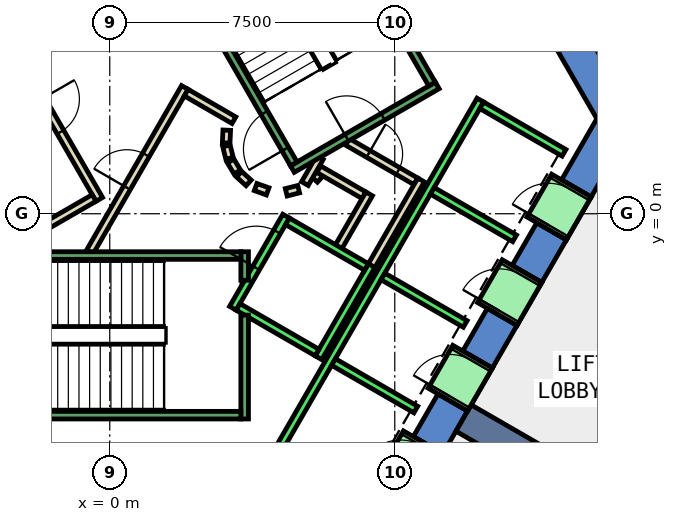
"""IFC4 building model, lengths in metres.
Left out: names, types, materials, properties, quantities, classifications, styles, units other than length and angle.
Written with IfcOpenShell. Run it as: python <this file> out.ifc"""

import sys

from ifc_helpers import new_model, si_unit, direction, frame, frame_2d, origin, place, context, subcontext, project, spatial, polyline, rectangle, outline, extrude, element, fill, save


model = new_model("IFC4")
c1 = context("Model", 3, precision=1e-05, world=origin(), true_north=direction((0.0, 1.0)))
c2 = subcontext(c1, "Body", "Model", "MODEL_VIEW")
j1 = project(units=[si_unit("LENGTHUNIT", "METRE"), si_unit("PLANEANGLEUNIT", "RADIAN")], contexts=[c1])
p1 = place(None, origin())
s1 = spatial("IfcSite", under=j1, at=p1, CompositionType="ELEMENT")
p2 = place(p1, origin())
s2 = spatial("IfcBuilding", under=s1, at=p2, CompositionType="ELEMENT")
p3 = place(p2, frame((0.0, 0.0, 95.0)))
s3 = spatial("IfcBuildingStorey", under=s2, at=p3, CompositionType="ELEMENT", Elevation=95.0)
p4 = place(p3, frame((0.0, 0.0, -0.4)))
e1 = element("IfcWall", 1, at=p4, inside=s3, PredefinedType="SHEAR", context=c2, shape_type="SweptSolid", body=[
    extrude(outline(polyline([(8.517, 11.748), (7.738, 11.298), (12.817, 2.5), (13.856, 2.5), (8.517, 11.748)])), origin(), (0.0, 0.0, 1.0), 4.2),
])
p5 = place(p3, frame((0.0, 0.0, -0.4)))
e2 = element("IfcWall", 2, at=p5, inside=s3, PredefinedType="SHEAR", context=c2, shape_type="SweptSolid", body=[
    extrude(outline(polyline([(9.417, -5.189), (8.638, -4.739), (7.988, -5.864), (8.767, -6.314), (9.417, -5.189)])), origin(), (0.0, 0.0, 1.0), 4.2),
])
p6 = place(p3, frame((0.0, 0.0, -0.4)))
e3 = element("IfcWall", 3, at=p6, inside=s3, PredefinedType="SHEAR", context=c2, shape_type="SweptSolid", body=[
    extrude(outline(polyline([(10.717, -2.937), (9.938, -2.487), (9.288, -3.613), (10.067, -4.063), (10.717, -2.937)])), origin(), (0.0, 0.0, 1.0), 4.2),
])
p7 = place(p3, frame((0.0, 0.0, -0.4)))
e4 = element("IfcWall", 4, at=p7, inside=s3, PredefinedType="SHEAR", context=c2, shape_type="SweptSolid", body=[
    extrude(outline(polyline([(12.017, -0.686), (11.238, -0.236), (10.588, -1.361), (11.367, -1.811), (12.017, -0.686)])), origin(), (0.0, 0.0, 1.0), 4.2),
])
p8 = place(p3, frame((0.0, 0.0, -0.4)))
e5 = element("IfcWall", 5, at=p8, inside=s3, PredefinedType="SHEAR", context=c2, shape_type="SweptSolid", body=[
    extrude(outline(polyline([(11.888, 0.89), (12.667, 0.44), (13.856, 2.5), (12.817, 2.5), (11.888, 0.89)])), origin(), (0.0, 0.0, 1.0), 4.2),
])
p9 = place(p3, frame((0.0, 0.0, 3.6)))
e6 = element("IfcWall", 6, at=p9, inside=s3, PredefinedType="SHEAR", context=c2, shape_type="SweptSolid", body=[
    extrude(outline(polyline([(8.767, -6.314), (7.988, -5.864), (7.338, -6.99), (8.117, -7.44), (8.767, -6.314)])), origin(), (0.0, 0.0, 1.0), 0.2),
])
p10 = place(p3, frame((0.0, 0.0, 3.6)))
e7 = element("IfcWall", 7, at=p10, inside=s3, PredefinedType="SHEAR", context=c2, shape_type="SweptSolid", body=[
    extrude(outline(polyline([(10.067, -4.063), (9.288, -3.613), (8.638, -4.739), (9.417, -5.189), (10.067, -4.063)])), origin(), (0.0, 0.0, 1.0), 0.2),
])
p11 = place(p3, frame((0.0, 0.0, 3.6)))
e8 = element("IfcWall", 8, at=p11, inside=s3, PredefinedType="SHEAR", context=c2, shape_type="SweptSolid", body=[
    extrude(outline(polyline([(11.367, -1.811), (10.588, -1.361), (9.938, -2.487), (10.717, -2.937), (11.367, -1.811)])), origin(), (0.0, 0.0, 1.0), 0.2),
])
p12 = place(p3, frame((0.0, 0.0, 3.6)))
e9 = element("IfcWall", 9, at=p12, inside=s3, PredefinedType="SHEAR", context=c2, shape_type="SweptSolid", body=[
    extrude(outline(polyline([(12.667, 0.44), (11.888, 0.89), (11.238, -0.236), (12.017, -0.686), (12.667, 0.44)])), origin(), (0.0, 0.0, 1.0), 0.2),
])
p13 = place(p3, frame((9.31, -5.375, -0.4), z_axis=(0.0, 0.0, 1.0), x_axis=(0.866017533419, -0.500013631625, 0.0)))
e10 = element("IfcWall", 10, at=p13, inside=s3, PredefinedType="SHEAR", context=c2, shape_type="SweptSolid", body=[
    extrude(rectangle(XDim=9.0, YDim=0.8, at=frame_2d((4.5, 0.0))), origin(), (0.0, 0.0, 1.0), 4.2),
])
p14 = place(p3, frame((5.39, 0.898, 0.0), z_axis=(0.0, 0.0, 1.0), x_axis=(0.673828488714, 0.738887791073, 0.0)))
e11 = element("IfcWall", 11, at=p14, inside=s3, PredefinedType="PARTITIONING", context=c2, shape_type="SweptSolid", body=[
    extrude(rectangle(XDim=0.263, YDim=0.2, at=frame_2d((0.131, 0.0))), origin(), (0.0, 0.0, 1.0), 3.8),
])
p15 = place(p3, frame((5.499, 1.172, 0.0), z_axis=(0.0, 0.0, 1.0), x_axis=(0.866333505267, -0.499465972466, 0.0)))
e12 = element("IfcWall", 12, at=p15, inside=s3, PredefinedType="PARTITIONING", context=c2, shape_type="SweptSolid", body=[
    extrude(rectangle(XDim=1.374, YDim=0.2, at=frame_2d((0.687, 0.0))), origin(), (0.0, 0.0, 1.0), 3.8),
])
p16 = place(p3, frame((6.826, 0.522, 0.0), z_axis=(0.0, 0.0, 1.0), x_axis=(-0.500016722714, -0.866015748706, 0.0)))
e13 = element("IfcWall", 13, at=p16, inside=s3, PredefinedType="PARTITIONING", context=c2, shape_type="SweptSolid", body=[
    extrude(rectangle(XDim=1.7, YDim=0.2, at=frame_2d((0.85, 0.0))), origin(), (0.0, 0.0, 1.0), 3.8),
])
p17 = place(p3, frame((6.25, 1.894, 0.0), z_axis=(0.0, 0.0, 1.0), x_axis=(0.866043184279, -0.499969202016, 0.0)))
e14 = element("IfcWall", 14, at=p17, inside=s3, PredefinedType="PARTITIONING", context=c2, shape_type="SweptSolid", body=[
    extrude(rectangle(XDim=2.084, YDim=0.2, at=frame_2d((1.042, 0.0))), origin(), (0.0, 0.0, 1.0), 3.8),
])
p18 = place(p17, frame((0.642, 0.0, 0.0)))
e15 = element("IfcOpeningElement", 15, at=p18, cuts=e14, PredefinedType="OPENING", context=c2, shape_type="SweptSolid", body=[
    extrude(rectangle(XDim=0.9, YDim=2.1, at=frame_2d((0.45, 1.05))), frame((0.0, 0.11, 0.0), z_axis=(0.0, -1.0, 0.0), x_axis=(1.0, 0.0, 0.0)), (0.0, 0.0, 1.0), 0.22),
])
p19 = place(p3, frame((8.192, 0.888, 0.0), z_axis=(0.0, 0.0, 1.0), x_axis=(-0.499940625693, -0.866059680843, 0.0)))
e16 = element("IfcWall", 16, at=p19, inside=s3, PredefinedType="PARTITIONING", context=c2, shape_type="SweptSolid", body=[
    extrude(rectangle(XDim=2.68, YDim=0.2, at=frame_2d((1.34, 0.0))), origin(), (0.0, 0.0, 1.0), 3.8),
])
p20 = place(p3, frame((5.135, 0.793, 0.0), z_axis=(0.0, 0.0, 1.0), x_axis=(0.499526442893, 0.866298639529, 0.0)))
e17 = element("IfcWall", 17, at=p20, inside=s3, PredefinedType="PARTITIONING", context=c2, shape_type="SweptSolid", body=[
    extrude(rectangle(XDim=0.791, YDim=0.2, at=frame_2d((0.396, 0.0))), origin(), (0.0, 0.0, 1.0), 3.8),
])
p21 = place(p3, frame((-0.52, -1.0, 0.0), z_axis=(0.0, 0.0, 1.0), x_axis=(0.50011622646, 0.865958290007, 0.0)))
e18 = element("IfcWall", 18, at=p21, inside=s3, PredefinedType="PARTITIONING", context=c2, shape_type="SweptSolid", body=[
    extrude(rectangle(XDim=4.991, YDim=0.2, at=frame_2d((2.496, 0.0))), origin(), (0.0, 0.0, 1.0), 3.8),
])
p22 = place(p21, frame((1.945, 0.0, 0.0)))
e19 = element("IfcOpeningElement", 19, at=p22, cuts=e18, PredefinedType="OPENING", context=c2, shape_type="SweptSolid", body=[
    extrude(rectangle(XDim=1.0, YDim=2.1, at=frame_2d((0.5, 1.05))), frame((0.0, 0.11, 0.0), z_axis=(0.0, -1.0, 0.0), x_axis=(1.0, 0.0, 0.0)), (0.0, 0.0, 1.0), 0.22),
])
p23 = place(p3, frame((2.012, 3.186, 0.0), z_axis=(0.0, 0.0, 1.0), x_axis=(0.865891012941, -0.500232699559, 0.0)))
e20 = element("IfcWall", 20, at=p23, inside=s3, PredefinedType="PARTITIONING", context=c2, shape_type="SweptSolid", body=[
    extrude(rectangle(XDim=1.449, YDim=0.2, at=frame_2d((0.725, 0.0))), origin(), (0.0, 0.0, 1.0), 3.8),
])
p24 = place(p3, frame((3.079, 2.199, 0.0), z_axis=(0.0, 0.0, 1.0), x_axis=(-0.047771483479, -0.998858290933, 0.0)))
e21 = element("IfcWall", 21, at=p24, inside=s3, PredefinedType="PARTITIONING", context=c2, shape_type="SweptSolid", body=[
    extrude(rectangle(XDim=0.337, YDim=0.2, at=frame_2d((0.169, 0.0))), origin(), (0.0, 0.0, 1.0), 3.8),
])
p25 = place(p3, frame((3.07, 1.786, 0.0), z_axis=(0.0, 0.0, 1.0), x_axis=(0.242705583207, -0.970099994784, 0.0)))
e22 = element("IfcWall", 22, at=p25, inside=s3, PredefinedType="PARTITIONING", context=c2, shape_type="SweptSolid", body=[
    extrude(rectangle(XDim=0.338, YDim=0.2, at=frame_2d((0.169, 0.0))), origin(), (0.0, 0.0, 1.0), 3.8),
])
for number, where, z_axis, x_axis in (
    (23, (3.182, 1.388, 0.0), (0.0, 0.0, 1.0), (0.512, -0.859, 0.0)),
    (24, (3.404, 1.039, 0.0), (0.0, 0.0, 1.0), (0.74, -0.672, 0.0)),
):
    element("IfcWall", number, at=place(p3, frame(where, z_axis=z_axis, x_axis=x_axis)), inside=s3, PredefinedType="PARTITIONING", context=c2, shape_type="SweptSolid", body=[
        extrude(rectangle(XDim=0.338, YDim=0.2, at=frame_2d((0.169, 0.0))), origin(), (0.0, 0.0, 1.0), 3.8),
    ])
p26 = place(p3, frame((3.838, 0.702, 0.0), z_axis=(0.0, 0.0, 1.0), x_axis=(0.941035081519, -0.338308993895, 0.0)))
e25 = element("IfcWall", 25, at=p26, inside=s3, PredefinedType="PARTITIONING", context=c2, shape_type="SweptSolid", body=[
    extrude(rectangle(XDim=0.337, YDim=0.2, at=frame_2d((0.168, 0.0))), origin(), (0.0, 0.0, 1.0), 3.8),
])
p27 = place(p3, frame((4.644, 0.564, 0.0), z_axis=(0.0, 0.0, 1.0), x_axis=(0.969929076366, 0.243387729394, 0.0)))
e26 = element("IfcWall", 26, at=p27, inside=s3, PredefinedType="PARTITIONING", context=c2, shape_type="SweptSolid", body=[
    extrude(rectangle(XDim=0.337, YDim=0.2, at=frame_2d((0.168, 0.0))), origin(), (0.0, 0.0, 1.0), 3.8),
])
p28 = place(p3, frame((-2.771, 4.7, 0.0), z_axis=(0.0, 0.0, 1.0), x_axis=(0.499969479948, -0.866043023828, 0.0)))
e27 = element("IfcWall", 27, at=p28, inside=s3, PredefinedType="PARTITIONING", context=c2, shape_type="SweptSolid", body=[
    extrude(rectangle(XDim=4.99, YDim=0.2, at=frame_2d((2.495, 0.0))), origin(), (0.0, 0.0, 1.0), 3.8),
])
p29 = place(p28, frame((1.945, 0.0, 0.0)))
e28 = element("IfcOpeningElement", 28, at=p29, cuts=e27, PredefinedType="OPENING", context=c2, shape_type="SweptSolid", body=[
    extrude(rectangle(XDim=1.0, YDim=2.1, at=frame_2d((0.5, 1.05))), frame((0.0, 0.11, 0.0), z_axis=(0.0, -1.0, 0.0), x_axis=(1.0, 0.0, 0.0)), (0.0, 0.0, 1.0), 0.22),
])
p30 = place(p3, frame((-0.412, 0.414, 0.0), z_axis=(0.0, 0.0, 1.0), x_axis=(-0.866017369001, -0.500013916395, 0.0)))
e29 = element("IfcWall", 29, at=p30, inside=s3, PredefinedType="PARTITIONING", context=c2, shape_type="SweptSolid", body=[
    extrude(rectangle(XDim=1.45, YDim=0.2, at=frame_2d((0.725, 0.0))), origin(), (0.0, 0.0, 1.0), 3.8),
])
p31 = place(p3, frame((18.009, 2.092, 0.0), z_axis=(0.0, 0.0, 1.0), x_axis=(-0.499980796252, -0.866036490789, 0.0)))
e30 = element("IfcWall", 30, at=p31, inside=s3, PredefinedType="PARTITIONING", context=c2, shape_type="SweptSolid", body=[
    extrude(rectangle(XDim=10.417, YDim=0.2, at=frame_2d((5.208, 0.0))), origin(), (0.0, 0.0, 1.0), 3.8),
])
p32 = place(p3, frame((3.24, -2.488, 0.0), z_axis=(0.0, 0.0, 1.0), x_axis=(0.49994636267, 0.866056369097, 0.0)))
e31 = element("IfcWall", 31, at=p32, inside=s3, PredefinedType="STANDARD", context=c2, shape_type="SweptSolid", body=[
    extrude(rectangle(XDim=2.8, YDim=0.2, at=frame_2d((1.4, 0.0))), origin(), (0.0, 0.0, 1.0), 3.8),
])
p33 = place(p32, frame((1.225, 0.0, 0.0)))
e32 = element("IfcOpeningElement", 32, at=p33, cuts=e31, PredefinedType="OPENING", context=c2, shape_type="SweptSolid", body=[
    extrude(rectangle(XDim=1.1, YDim=2.1, at=frame_2d((0.55, 1.05))), frame((0.0, 0.11, 0.0), z_axis=(0.0, -1.0, 0.0), x_axis=(1.0, 0.0, 0.0)), (0.0, 0.0, 1.0), 0.22),
])
p34 = place(p3, frame((5.492, -3.788, 0.0), z_axis=(0.0, 0.0, 1.0), x_axis=(0.500011755427, 0.866018616679, 0.0)))
e33 = element("IfcWall", 33, at=p34, inside=s3, PredefinedType="STANDARD", context=c2, shape_type="SweptSolid", body=[
    extrude(rectangle(XDim=2.8, YDim=0.2, at=frame_2d((1.4, 0.0))), origin(), (0.0, 0.0, 1.0), 3.8),
])
p35 = place(p3, frame((3.377, -2.452, 0.0), z_axis=(0.0, 0.0, 1.0), x_axis=(0.865955154139, -0.50012165622, 0.0)))
e34 = element("IfcWall", 34, at=p35, inside=s3, PredefinedType="STANDARD", context=c2, shape_type="SweptSolid", body=[
    extrude(rectangle(XDim=2.4, YDim=0.2, at=frame_2d((1.2, 0.0))), origin(), (0.0, 0.0, 1.0), 3.8),
])
p36 = place(p3, frame((4.677, -0.2, 0.0), z_axis=(0.0, 0.0, 1.0), x_axis=(0.865973769406, -0.500089422704, 0.0)))
e35 = element("IfcWall", 35, at=p36, inside=s3, PredefinedType="STANDARD", context=c2, shape_type="SweptSolid", body=[
    extrude(rectangle(XDim=2.399, YDim=0.2, at=frame_2d((1.2, 0.0))), origin(), (0.0, 0.0, 1.0), 3.8),
])
p37 = place(p3, frame((4.451, -6.19, 0.0), z_axis=(0.0, 0.0, 1.0), x_axis=(0.50000090737, 0.866024879913, 0.0)))
e36 = element("IfcWall", 36, at=p37, inside=s3, PredefinedType="STANDARD", context=c2, shape_type="SweptSolid", body=[
    extrude(rectangle(XDim=10.6, YDim=0.2, at=frame_2d((5.3, 0.0))), origin(), (0.0, 0.0, 1.0), 3.8),
])
for number, where, z_axis, x_axis in (
    (37, (5.888, -3.902, 0.0), (0.0, 0.0, 1.0), (0.866, -0.5, 0.0)),
    (38, (7.188, -1.65, 0.0), (0.0, 0.0, 1.0), (0.866, -0.5, 0.0)),
    (39, (8.488, 0.602, 0.0), (0.0, 0.0, 1.0), (0.866, -0.5, 0.0)),
):
    element("IfcWall", number, at=place(p3, frame(where, z_axis=z_axis, x_axis=x_axis)), inside=s3, PredefinedType="STANDARD", context=c2, shape_type="SweptSolid", body=[
        extrude(rectangle(XDim=2.5, YDim=0.2, at=frame_2d((1.25, 0.0))), origin(), (0.0, 0.0, 1.0), 3.8),
    ])
p38 = place(p3, frame((9.788, 2.853, 0.0), z_axis=(0.0, 0.0, 1.0), x_axis=(0.865998541277, -0.500046524342, 0.0)))
e40 = element("IfcWall", 40, at=p38, inside=s3, PredefinedType="STANDARD", context=c2, shape_type="SweptSolid", body=[
    extrude(rectangle(XDim=2.5, YDim=0.2, at=frame_2d((1.25, 0.0))), origin(), (0.0, 0.0, 1.0), 3.8),
])
p39 = place(p3, frame((7.598, -7.14, 0.0), z_axis=(0.0, 0.0, 1.0), x_axis=(0.500362116554, 0.865816234728, 0.0)))
e41 = element("IfcWall", 41, at=p39, inside=s3, PredefinedType="STANDARD", context=c2, shape_type="SweptSolid", body=[
    extrude(rectangle(XDim=1.299, YDim=1.2, at=frame_2d((0.65, 0.0))), origin(), (0.0, 0.0, 1.0), 2.4),
])
p40 = place(p39, frame((0.1, 0.0, 0.0)))
e42 = element("IfcOpeningElement", 42, at=p40, cuts=e41, PredefinedType="OPENING", context=c2, shape_type="SweptSolid", body=[
    extrude(rectangle(XDim=1.1, YDim=2.3, at=frame_2d((0.55, 1.15))), frame((0.0, 0.61, 0.0), z_axis=(0.0, -1.0, 0.0), x_axis=(1.0, 0.0, 0.0)), (0.0, 0.0, 1.0), 1.22),
])
p41 = place(p3, frame((8.898, -4.889, 0.0), z_axis=(0.0, 0.0, 1.0), x_axis=(0.500036693733, 0.866004217611, 0.0)))
e43 = element("IfcWall", 43, at=p41, inside=s3, PredefinedType="STANDARD", context=c2, shape_type="SweptSolid", body=[
    extrude(rectangle(XDim=1.3, YDim=1.2, at=frame_2d((0.65, 0.0))), origin(), (0.0, 0.0, 1.0), 2.4),
])
p42 = place(p41, frame((0.1, 0.0, 0.0)))
e44 = element("IfcOpeningElement", 44, at=p42, cuts=e43, PredefinedType="OPENING", context=c2, shape_type="SweptSolid", body=[
    extrude(rectangle(XDim=1.1, YDim=2.3, at=frame_2d((0.55, 1.15))), frame((0.0, 0.61, 0.0), z_axis=(0.0, -1.0, 0.0), x_axis=(1.0, 0.0, 0.0)), (0.0, 0.0, 1.0), 1.22),
])
p43 = place(p3, frame((10.198, -2.637, 0.0), z_axis=(0.0, 0.0, 1.0), x_axis=(0.49989585183, 0.866085525409, 0.0)))
e45 = element("IfcWall", 45, at=p43, inside=s3, PredefinedType="STANDARD", context=c2, shape_type="SweptSolid", body=[
    extrude(rectangle(XDim=1.3, YDim=1.2, at=frame_2d((0.65, 0.0))), origin(), (0.0, 0.0, 1.0), 2.4),
])
p44 = place(p43, frame((0.1, 0.0, 0.0)))
e46 = element("IfcOpeningElement", 46, at=p44, cuts=e45, PredefinedType="OPENING", context=c2, shape_type="SweptSolid", body=[
    extrude(rectangle(XDim=1.1, YDim=2.3, at=frame_2d((0.55, 1.15))), frame((0.0, 0.61, 0.0), z_axis=(0.0, -1.0, 0.0), x_axis=(1.0, 0.0, 0.0)), (0.0, 0.0, 1.0), 1.22),
])
p45 = place(p3, frame((11.498, -0.385, 0.0), z_axis=(0.0, 0.0, 1.0), x_axis=(0.500221244143, 0.865897630733, 0.0)))
e47 = element("IfcWall", 47, at=p45, inside=s3, PredefinedType="STANDARD", context=c2, shape_type="SweptSolid", body=[
    extrude(rectangle(XDim=1.299, YDim=1.2, at=frame_2d((0.65, 0.0))), origin(), (0.0, 0.0, 1.0), 2.4),
])
p46 = place(p45, frame((0.1, 0.0, 0.0)))
e48 = element("IfcOpeningElement", 48, at=p46, cuts=e47, PredefinedType="OPENING", context=c2, shape_type="SweptSolid", body=[
    extrude(rectangle(XDim=1.1, YDim=2.3, at=frame_2d((0.55, 1.15))), frame((0.0, 0.61, 0.0), z_axis=(0.0, -1.0, 0.0), x_axis=(1.0, 0.0, 0.0)), (0.0, 0.0, 1.0), 1.22),
])
p47 = place(p3, frame((3.55, -2.667, 0.0), z_axis=(0.0, 0.0, 1.0), x_axis=(0.0, -1.0, 0.0)))
e49 = element("IfcWall", 49, at=p47, inside=s3, PredefinedType="STANDARD", context=c2, shape_type="SweptSolid", body=[
    extrude(rectangle(XDim=2.733, YDim=0.2, at=frame_2d((1.366, 0.0))), origin(), (0.0, 0.0, 1.0), 3.8),
])
p48 = place(p3, frame((3.55, -1.0, 0.0), z_axis=(0.0, 0.0, 1.0), x_axis=(0.0, -1.0, 0.0)))
e50 = element("IfcWall", 50, at=p48, inside=s3, PredefinedType="STANDARD", context=c2, shape_type="SweptSolid", body=[
    extrude(rectangle(XDim=0.751, YDim=0.2, at=frame_2d((0.375, 0.0))), origin(), (0.0, 0.0, 1.0), 3.8),
])
p49 = place(p3, frame((-3.45, -1.1, 0.0), z_axis=(0.0, 0.0, 1.0), x_axis=(1.0, 0.0, 0.0)))
e51 = element("IfcWall", 51, at=p49, inside=s3, PredefinedType="STANDARD", context=c2, shape_type="SweptSolid", body=[
    extrude(rectangle(XDim=6.9, YDim=0.2, at=frame_2d((3.45, 0.0))), origin(), (0.0, 0.0, 1.0), 3.8),
])
p50 = place(p49, frame((0.45, 0.0, 0.0)))
e52 = element("IfcOpeningElement", 52, at=p50, cuts=e51, PredefinedType="OPENING", context=c2, shape_type="SweptSolid", body=[
    extrude(rectangle(XDim=1.1, YDim=2.2, at=frame_2d((0.55, 1.1))), frame((0.0, 0.11, 0.0), z_axis=(0.0, -1.0, 0.0), x_axis=(1.0, 0.0, 0.0)), (0.0, 0.0, 1.0), 0.22),
])
p51 = place(p3, frame((-3.45, -5.3, 0.0), z_axis=(0.0, 0.0, 1.0), x_axis=(1.0, 0.0, 0.0)))
e53 = element("IfcWall", 53, at=p51, inside=s3, PredefinedType="STANDARD", context=c2, shape_type="SweptSolid", body=[
    extrude(rectangle(XDim=6.9, YDim=0.2, at=frame_2d((3.45, 0.0))), origin(), (0.0, 0.0, 1.0), 3.8),
])
p52 = place(p3, frame((4.806, 1.176, 0.0), z_axis=(0.0, 0.0, 1.0), x_axis=(0.866059941101, 0.499940174841, 0.0)))
e54 = element("IfcWall", 54, at=p52, inside=s3, PredefinedType="STANDARD", context=c2, shape_type="SweptSolid", body=[
    extrude(rectangle(XDim=4.4, YDim=0.2, at=frame_2d((2.2, 0.0))), origin(), (0.0, 0.0, 1.0), 3.8),
])
p53 = place(p52, frame((1.65, 0.0, 0.0)))
e55 = element("IfcOpeningElement", 55, at=p53, cuts=e54, PredefinedType="OPENING", context=c2, shape_type="SweptSolid", body=[
    extrude(rectangle(XDim=1.1, YDim=2.2, at=frame_2d((0.55, 1.1))), frame((0.0, 0.11, 0.0), z_axis=(0.0, -1.0, 0.0), x_axis=(1.0, 0.0, 0.0)), (0.0, 0.0, 1.0), 0.22),
])
p54 = place(p3, frame((4.843, 1.312, 0.0), z_axis=(0.0, 0.0, 1.0), x_axis=(-0.499963383562, 0.866046543262, 0.0)))
e56 = element("IfcWall", 56, at=p54, inside=s3, PredefinedType="STANDARD", context=c2, shape_type="SweptSolid", body=[
    extrude(rectangle(XDim=6.9, YDim=0.2, at=frame_2d((3.45, 0.0))), origin(), (0.0, 0.0, 1.0), 3.8),
])
p55 = place(p54, frame((0.45, 0.0, 0.0)))
e57 = element("IfcOpeningElement", 57, at=p55, cuts=e56, PredefinedType="OPENING", context=c2, shape_type="SweptSolid", body=[
    extrude(rectangle(XDim=1.1, YDim=2.2, at=frame_2d((0.55, 1.1))), frame((0.0, 0.11, 0.0), z_axis=(0.0, -1.0, 0.0), x_axis=(1.0, 0.0, 0.0)), (0.0, 0.0, 1.0), 0.22),
])
p56 = place(p3, frame((8.48, 3.412, 0.0), z_axis=(0.0, 0.0, 1.0), x_axis=(-0.499978703459, 0.866037698999, 0.0)))
e58 = element("IfcWall", 58, at=p56, inside=s3, PredefinedType="STANDARD", context=c2, shape_type="SweptSolid", body=[
    extrude(rectangle(XDim=6.9, YDim=0.2, at=frame_2d((3.45, 0.0))), origin(), (0.0, 0.0, 1.0), 3.8),
])
p57 = place(p3, frame((-1.393, 7.288, 0.0), z_axis=(0.0, 0.0, 1.0), x_axis=(-0.499963383562, -0.866046543262, 0.0)))
e59 = element("IfcWall", 59, at=p57, inside=s3, PredefinedType="STANDARD", context=c2, shape_type="SweptSolid", body=[
    extrude(rectangle(XDim=6.9, YDim=0.2, at=frame_2d((3.45, 0.0))), origin(), (0.0, 0.0, 1.0), 3.8),
])
p58 = place(p57, frame((0.45, 0.0, 0.0)))
e60 = element("IfcOpeningElement", 60, at=p58, cuts=e59, PredefinedType="OPENING", context=c2, shape_type="SweptSolid", body=[
    extrude(rectangle(XDim=1.1, YDim=2.2, at=frame_2d((0.55, 1.1))), frame((0.0, 0.11, 0.0), z_axis=(0.0, -1.0, 0.0), x_axis=(1.0, 0.0, 0.0)), (0.0, 0.0, 1.0), 0.22),
])
p59 = place(p22, origin())
e61 = element("IfcDoor", 61, at=p59, inside=s3, OperationType="SINGLE_SWING_LEFT", PredefinedType="DOOR", context=c2, shape_type="SweptSolid", body=[
    extrude(rectangle(XDim=1.0, YDim=2.1, at=frame_2d((0.5, 1.05))), frame((0.0, 0.025, 0.0), z_axis=(0.0, -1.0, 0.0), x_axis=(1.0, 0.0, 0.0)), (0.0, 0.0, 1.0), 0.05),
])
fill(e19, e61)
p60 = place(p29, origin())
e62 = element("IfcDoor", 62, at=p60, inside=s3, OperationType="SINGLE_SWING_RIGHT", PredefinedType="DOOR", context=c2, shape_type="SweptSolid", body=[
    extrude(rectangle(XDim=1.0, YDim=2.1, at=frame_2d((0.5, 1.05))), frame((0.0, 0.025, 0.0), z_axis=(0.0, -1.0, 0.0), x_axis=(1.0, 0.0, 0.0)), (0.0, 0.0, 1.0), 0.05),
])
fill(e28, e62)
p61 = place(p18, origin())
e63 = element("IfcDoor", 63, at=p61, inside=s3, OperationType="SINGLE_SWING_LEFT", PredefinedType="DOOR", context=c2, shape_type="SweptSolid", body=[
    extrude(rectangle(XDim=0.9, YDim=2.1, at=frame_2d((0.45, 1.05))), frame((0.0, 0.025, 0.0), z_axis=(0.0, -1.0, 0.0), x_axis=(1.0, 0.0, 0.0)), (0.0, 0.0, 1.0), 0.05),
])
fill(e15, e63)
p62 = place(p42, origin())
e64 = element("IfcDoor", 64, at=p62, inside=s3, OperationType="SLIDING_TO_LEFT", PredefinedType="DOOR", context=c2, shape_type="SweptSolid", body=[
    extrude(rectangle(XDim=1.1, YDim=2.3, at=frame_2d((0.55, 1.15))), frame((0.0, 0.025, 0.0), z_axis=(0.0, -1.0, 0.0), x_axis=(1.0, 0.0, 0.0)), (0.0, 0.0, 1.0), 0.05),
])
fill(e44, e64)
p63 = place(p44, origin())
e65 = element("IfcDoor", 65, at=p63, inside=s3, OperationType="SLIDING_TO_LEFT", PredefinedType="DOOR", context=c2, shape_type="SweptSolid", body=[
    extrude(rectangle(XDim=1.1, YDim=2.3, at=frame_2d((0.55, 1.15))), frame((0.0, 0.025, 0.0), z_axis=(0.0, -1.0, 0.0), x_axis=(1.0, 0.0, 0.0)), (0.0, 0.0, 1.0), 0.05),
])
fill(e46, e65)
p64 = place(p46, origin())
e66 = element("IfcDoor", 66, at=p64, inside=s3, OperationType="SLIDING_TO_LEFT", PredefinedType="DOOR", context=c2, shape_type="SweptSolid", body=[
    extrude(rectangle(XDim=1.1, YDim=2.3, at=frame_2d((0.55, 1.15))), frame((0.0, 0.025, 0.0), z_axis=(0.0, -1.0, 0.0), x_axis=(1.0, 0.0, 0.0)), (0.0, 0.0, 1.0), 0.05),
])
fill(e48, e66)
p65 = place(p33, origin())
e67 = element("IfcDoor", 67, at=p65, inside=s3, OperationType="SLIDING_TO_LEFT", PredefinedType="DOOR", context=c2, shape_type="SweptSolid", body=[
    extrude(rectangle(XDim=1.1, YDim=2.1, at=frame_2d((0.55, 1.05))), frame((0.0, 0.025, 0.0), z_axis=(0.0, -1.0, 0.0), x_axis=(1.0, 0.0, 0.0)), (0.0, 0.0, 1.0), 0.05),
])
fill(e32, e67)
p66 = place(p55, origin())
e68 = element("IfcDoor", 68, at=p66, inside=s3, OperationType="SINGLE_SWING_LEFT", PredefinedType="DOOR", context=c2, shape_type="SweptSolid", body=[
    extrude(rectangle(XDim=1.1, YDim=2.2, at=frame_2d((0.55, 1.1))), frame((0.0, 0.025, 0.0), z_axis=(0.0, -1.0, 0.0), x_axis=(1.0, 0.0, 0.0)), (0.0, 0.0, 1.0), 0.05),
])
fill(e57, e68)
p67 = place(p53, origin())
e69 = element("IfcDoor", 69, at=p67, inside=s3, OperationType="SINGLE_SWING_LEFT", PredefinedType="DOOR", context=c2, shape_type="SweptSolid", body=[
    extrude(rectangle(XDim=1.1, YDim=2.2, at=frame_2d((0.55, 1.1))), frame((0.0, 0.025, 0.0), z_axis=(0.0, -1.0, 0.0), x_axis=(1.0, 0.0, 0.0)), (0.0, 0.0, 1.0), 0.05),
])
fill(e55, e69)
save(model, sys.argv[1])
